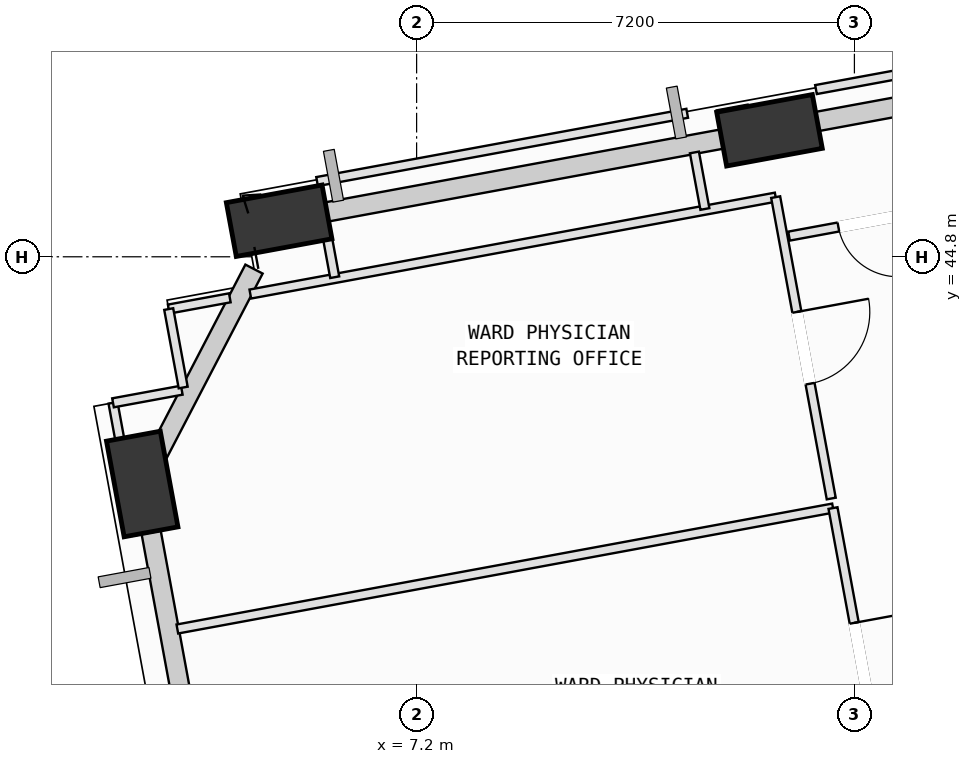
"""IFC4 building model, lengths in metres.
Left out: names, types, materials, properties, quantities, classifications, styles, units other than length and angle.
Written with IfcOpenShell. Run it as: python <this file> out.ifc"""

import sys

from ifc_helpers import new_model, si_unit, direction, frame, frame_2d, origin, origin_2d, place, context, subcontext, project, spatial, rectangle, extrude, element, fill, save


model = new_model("IFC4")
c1 = context("Model", 3, precision=1e-05, world=origin(), true_north=direction((0.0, 1.0)))
c2 = subcontext(c1, "Body", "Model", "MODEL_VIEW")
j1 = project(units=[si_unit("LENGTHUNIT", "METRE"), si_unit("PLANEANGLEUNIT", "RADIAN")], contexts=[c1])
p1 = place(None, origin())
s1 = spatial("IfcSite", under=j1, at=p1, CompositionType="ELEMENT")
p2 = place(p1, origin())
s2 = spatial("IfcBuilding", under=s1, at=p2, CompositionType="ELEMENT")
p3 = place(p2, frame((0.0, 0.0, 67.0)))
s3 = spatial("IfcBuildingStorey", under=s2, at=p3, CompositionType="ELEMENT", Elevation=67.0)
p4 = place(p3, frame((13.003, 46.88, 0.002), z_axis=(-0.090133434514, -0.085466134946, 0.992255765294), x_axis=(0.80725313107, -0.589775227835, 0.022529159111)))
e1 = element("IfcColumn", 1, at=p4, inside=s3, PredefinedType="COLUMN", context=c2, shape_type="SweptSolid", body=[
    extrude(rectangle(XDim=1.6, YDim=0.9, at=origin_2d()), origin(), (0.0, 0.0, 1.0), 4.028),
])
p5 = place(p3, frame((4.939, 45.393, 0.002), z_axis=(-0.083472850477, -0.11828846371, 0.989464563583), x_axis=(0.906971649955, -0.420372326755, 0.026258961828)))
e2 = element("IfcColumn", 2, at=p5, inside=s3, PredefinedType="COLUMN", context=c2, shape_type="SweptSolid", body=[
    extrude(rectangle(XDim=1.6, YDim=0.9, at=origin_2d()), origin(), (0.0, 0.0, 1.0), 4.039),
])
p6 = place(p3, frame((2.688, 41.063, 0.002), z_axis=(-0.065656111176, -0.127382528773, 0.989678213577), x_axis=(0.284677046558, 0.948207555365, 0.140930518737)))
e3 = element("IfcColumn", 3, at=p6, inside=s3, PredefinedType="COLUMN", context=c2, shape_type="SweptSolid", body=[
    extrude(rectangle(XDim=1.6, YDim=0.9, at=origin_2d()), origin(), (0.0, 0.0, 1.0), 4.038),
])
p7 = place(p3, frame((13.38, 46.95, 0.0), z_axis=(0.0, 0.0, 1.0), x_axis=(0.98341213731, 0.181385137737, 0.0)))
e4 = element("IfcWall", 4, at=p7, inside=s3, PredefinedType="SOLIDWALL", context=c2, shape_type="SweptSolid", body=[
    extrude(rectangle(XDim=7.003, YDim=0.32, at=frame_2d((3.501, 0.0))), origin(), (0.0, 0.0, 1.0), 3.165),
])
p8 = place(p3, frame((5.297, 45.459, 0.0), z_axis=(0.0, 0.0, 1.0), x_axis=(0.983408574272, 0.181404454324, 0.0)))
e5 = element("IfcWall", 5, at=p8, inside=s3, PredefinedType="SOLIDWALL", context=c2, shape_type="SweptSolid", body=[
    extrude(rectangle(XDim=7.035, YDim=0.32, at=frame_2d((3.517, 0.0))), origin(), (0.0, 0.0, 1.0), 3.165),
])
p9 = place(p3, frame((2.834, 41.345, 0.0), z_axis=(0.0, 0.0, 1.0), x_axis=(0.461354833391, 0.887215710922, 0.0)))
e6 = element("IfcWall", 6, at=p9, inside=s3, PredefinedType="SOLIDWALL", context=c2, shape_type="SweptSolid", body=[
    extrude(rectangle(XDim=3.666, YDim=0.32, at=frame_2d((1.833, 0.0))), origin(), (0.0, 0.0, 1.0), 3.165),
])
p10 = place(p3, frame((3.782, 35.129, 0.0), z_axis=(0.0, 0.0, 1.0), x_axis=(-0.181361105111, 0.983416569696, 0.0)))
e7 = element("IfcWall", 7, at=p10, inside=s3, PredefinedType="SOLIDWALL", context=c2, shape_type="SweptSolid", body=[
    extrude(rectangle(XDim=5.223, YDim=0.32, at=frame_2d((2.612, 0.0))), origin(), (0.0, 0.0, 1.0), 3.165),
])
p11 = place(p10, frame((0.99, 0.0, 0.75)))
e8 = element("IfcOpeningElement", 8, at=p11, cuts=e7, PredefinedType="OPENING", context=c2, shape_type="SweptSolid", body=[
    extrude(rectangle(XDim=1.4, YDim=1.85, at=frame_2d((0.7, 0.925))), frame((0.0, 0.17, 0.0), z_axis=(0.0, -1.0, 0.0), x_axis=(1.0, 0.0, 0.0)), (0.0, 0.0, 1.0), 0.34),
])
p12 = place(p3, frame((3.265, 38.678, 0.0), z_axis=(0.0, 0.0, 1.0), x_axis=(0.983410360614, 0.181394770149, 0.0)))
e9 = element("IfcWall", 9, at=p12, inside=s3, PredefinedType="PARTITIONING", context=c2, shape_type="SweptSolid", body=[
    extrude(rectangle(XDim=10.965, YDim=0.15, at=frame_2d((5.482, 0.0))), origin(), (0.0, 0.0, 1.0), 3.78),
])
p13 = place(p3, frame((14.048, 40.667, 0.0), z_axis=(0.0, 0.0, 1.0), x_axis=(0.181293102456, -0.983429108275, 0.0)))
e10 = element("IfcWall", 10, at=p13, inside=s3, PredefinedType="PARTITIONING", context=c2, shape_type="SweptSolid", body=[
    extrude(rectangle(XDim=5.041, YDim=0.15, at=frame_2d((2.52, 0.0))), origin(), (0.0, 0.0, 1.0), 3.78),
])
p14 = place(p13, frame((1.92, 0.0, 0.0)))
e11 = element("IfcOpeningElement", 11, at=p14, cuts=e10, PredefinedType="OPENING", context=c2, shape_type="SweptSolid", body=[
    extrude(rectangle(XDim=1.2, YDim=2.15, at=frame_2d((0.6, 1.075))), frame((0.0, 0.085, 0.0), z_axis=(0.0, -1.0, 0.0), x_axis=(1.0, 0.0, 0.0)), (0.0, 0.0, 1.0), 0.17),
])
p15 = place(p3, frame((3.123, 43.94, 0.0), z_axis=(0.0, 0.0, 1.0), x_axis=(0.9834621495, 0.181113777775, 0.0)))
e12 = element("IfcWall", 12, at=p15, inside=s3, PredefinedType="PARTITIONING", context=c2, shape_type="SweptSolid", body=[
    extrude(rectangle(XDim=1.022, YDim=0.15, at=frame_2d((0.511, 0.0))), origin(), (0.0, 0.0, 1.0), 3.78),
])
p16 = place(p3, frame((4.465, 44.187, 0.0), z_axis=(0.0, 0.0, 1.0), x_axis=(0.983403773202, 0.181430479393, 0.0)))
e13 = element("IfcWall", 13, at=p16, inside=s3, PredefinedType="PARTITIONING", context=c2, shape_type="SweptSolid", body=[
    extrude(rectangle(XDim=8.786, YDim=0.15, at=frame_2d((4.393, 0.0))), origin(), (0.0, 0.0, 1.0), 3.78),
])
p17 = place(p3, frame((13.105, 45.781, 0.0), z_axis=(0.0, 0.0, 1.0), x_axis=(0.181339945149, -0.983420471769, 0.0)))
e14 = element("IfcWall", 14, at=p17, inside=s3, PredefinedType="PARTITIONING", context=c2, shape_type="SweptSolid", body=[
    extrude(rectangle(XDim=5.041, YDim=0.15, at=frame_2d((2.52, 0.0))), origin(), (0.0, 0.0, 1.0), 2.865),
])
p18 = place(p17, frame((1.92, 0.0, 0.0)))
e15 = element("IfcOpeningElement", 15, at=p18, cuts=e14, PredefinedType="OPENING", context=c2, shape_type="SweptSolid", body=[
    extrude(rectangle(XDim=1.2, YDim=2.15, at=frame_2d((0.6, 1.075))), frame((0.0, 0.085, 0.0), z_axis=(0.0, -1.0, 0.0), x_axis=(1.0, 0.0, 0.0)), (0.0, 0.0, 1.0), 0.17),
])
p19 = place(p3, frame((2.608, 40.224, 0.0), z_axis=(0.0, 0.0, 1.0), x_axis=(-0.181353581065, 0.983417957247, 0.0)))
e16 = element("IfcWall", 16, at=p19, inside=s3, PredefinedType="PARTITIONING", context=c2, shape_type="SweptSolid", body=[
    extrude(rectangle(XDim=2.21, YDim=0.15, at=frame_2d((1.105, 0.0))), origin(), (0.0, 0.0, 1.0), 3.165),
])
p20 = place(p3, frame((2.207, 42.398, 0.0), z_axis=(0.0, 0.0, 1.0), x_axis=(0.98350093873, 0.180903022409, 0.0)))
e17 = element("IfcWall", 17, at=p20, inside=s3, PredefinedType="PARTITIONING", context=c2, shape_type="SweptSolid", body=[
    extrude(rectangle(XDim=1.15, YDim=0.15, at=frame_2d((0.575, 0.0))), origin(), (0.0, 0.0, 1.0), 3.78),
])
p21 = place(p3, frame((3.361, 42.65, 0.0), z_axis=(0.0, 0.0, 1.0), x_axis=(-0.181456106863, 0.983399044784, 0.0)))
e18 = element("IfcWall", 18, at=p21, inside=s3, PredefinedType="PARTITIONING", context=c2, shape_type="SweptSolid", body=[
    extrude(rectangle(XDim=1.312, YDim=0.15, at=frame_2d((0.656, 0.0))), origin(), (0.0, 0.0, 1.0), 3.78),
])
p22 = place(p3, frame((5.563, 46.037, 0.0), z_axis=(0.0, 0.0, 1.0), x_axis=(0.983409145415, 0.181401358084, 0.0)))
e19 = element("IfcWall", 19, at=p22, inside=s3, PredefinedType="PARTITIONING", context=c2, shape_type="SweptSolid", body=[
    extrude(rectangle(XDim=6.19, YDim=0.15, at=frame_2d((3.095, 0.0))), origin(), (0.0, 0.0, 1.0), 3.78),
])
p23 = place(p3, frame((11.769, 46.516, 0.0), z_axis=(0.0, 0.0, 1.0), x_axis=(0.181701071907, -0.983353812454, 0.0)))
e20 = element("IfcWall", 20, at=p23, inside=s3, PredefinedType="PARTITIONING", context=c2, shape_type="SweptSolid", body=[
    extrude(rectangle(XDim=0.946, YDim=0.15, at=frame_2d((0.473, 0.0))), origin(), (0.0, 0.0, 1.0), 3.78),
])
p24 = place(p3, frame((5.853, 44.464, 0.0), z_axis=(0.0, 0.0, 1.0), x_axis=(-0.181182164683, 0.983449552952, 0.0)))
e21 = element("IfcWall", 21, at=p24, inside=s3, PredefinedType="PARTITIONING", context=c2, shape_type="SweptSolid", body=[
    extrude(rectangle(XDim=0.945, YDim=0.15, at=frame_2d((0.472, 0.0))), origin(), (0.0, 0.0, 1.0), 3.78),
])
p25 = place(p3, frame((15.931, 45.621, 0.0), z_axis=(0.0, 0.0, 1.0), x_axis=(-0.983375347577, -0.18158448661, 0.0)))
e22 = element("IfcWall", 22, at=p25, inside=s3, PredefinedType="PARTITIONING", context=c2, shape_type="SweptSolid", body=[
    extrude(rectangle(XDim=2.65, YDim=0.15, at=frame_2d((1.325, 0.0))), origin(), (0.0, 0.0, 1.0), 3.78),
])
p26 = place(p25, frame((0.825, 0.0, 0.0)))
e23 = element("IfcOpeningElement", 23, at=p26, cuts=e22, PredefinedType="OPENING", context=c2, shape_type="SweptSolid", body=[
    extrude(rectangle(XDim=1.0, YDim=2.12, at=frame_2d((0.5, 1.06))), frame((0.0, 0.085, 0.0), z_axis=(0.0, -1.0, 0.0), x_axis=(1.0, 0.0, 0.0)), (0.0, 0.0, 1.0), 0.17),
])
p27 = place(p3, frame((13.768, 47.55, 0.0), z_axis=(0.0, 0.0, 1.0), x_axis=(0.983421602278, 0.181333814199, 0.0)))
e24 = element("IfcWall", 24, at=p27, inside=s3, PredefinedType="PARTITIONING", context=c2, shape_type="SweptSolid", body=[
    extrude(rectangle(XDim=4.097, YDim=0.15, at=frame_2d((2.048, 0.0))), origin(), (0.0, 0.0, 1.0), 3.78),
])
p28 = place(p14, origin())
e25 = element("IfcDoor", 25, at=p28, inside=s3, OperationType="SINGLE_SWING_LEFT", PredefinedType="DOOR", context=c2, shape_type="SweptSolid", body=[
    extrude(rectangle(XDim=1.2, YDim=2.15, at=frame_2d((0.6, 1.075))), frame((0.0, 0.025, 0.0), z_axis=(0.0, -1.0, 0.0), x_axis=(1.0, 0.0, 0.0)), (0.0, 0.0, 1.0), 0.05),
])
fill(e11, e25)
p29 = place(p18, origin())
e26 = element("IfcDoor", 26, at=p29, inside=s3, OperationType="SINGLE_SWING_LEFT", PredefinedType="DOOR", context=c2, shape_type="SweptSolid", body=[
    extrude(rectangle(XDim=1.2, YDim=2.15, at=frame_2d((0.6, 1.075))), frame((0.0, 0.025, 0.0), z_axis=(0.0, -1.0, 0.0), x_axis=(1.0, 0.0, 0.0)), (0.0, 0.0, 1.0), 0.05),
])
fill(e15, e26)
p30 = place(p26, origin())
e27 = element("IfcDoor", 27, at=p30, inside=s3, OperationType="SINGLE_SWING_LEFT", PredefinedType="DOOR", context=c2, shape_type="SweptSolid", body=[
    extrude(rectangle(XDim=1.0, YDim=2.12, at=frame_2d((0.5, 1.06))), frame((0.0, 0.025, 0.0), z_axis=(0.0, -1.0, 0.0), x_axis=(1.0, 0.0, 0.0)), (0.0, 0.0, 1.0), 0.05),
])
fill(e23, e27)
save(model, sys.argv[1])
